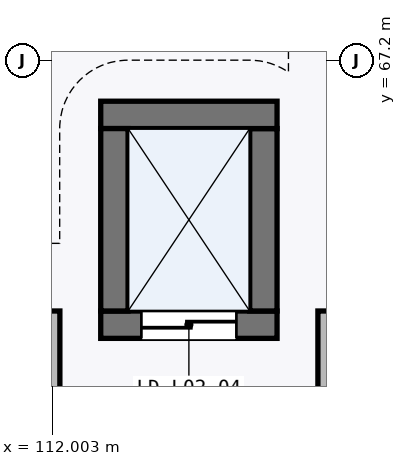
"""IFC4 building model, lengths in metres.
Left out: names, types, materials, properties, quantities, classifications, styles, units other than length and angle.
Written with IfcOpenShell. Run it as: python <this file> out.ifc"""

import sys

from ifc_helpers import new_model, si_unit, direction, frame, frame_2d, origin, place, context, subcontext, project, spatial, rectangle, extrude, element, fill, save


model = new_model("IFC4")
c1 = context("Model", 3, precision=1e-05, world=origin(), true_north=direction((0.0, 1.0)))
c2 = subcontext(c1, "Body", "Model", "MODEL_VIEW")
j1 = project(units=[si_unit("LENGTHUNIT", "METRE"), si_unit("PLANEANGLEUNIT", "RADIAN")], contexts=[c1])
p1 = place(None, origin())
s1 = spatial("IfcSite", under=j1, at=p1, CompositionType="ELEMENT")
p2 = place(p1, origin())
s2 = spatial("IfcBuilding", under=s1, at=p2, CompositionType="ELEMENT")
p3 = place(p2, frame((0.0, 0.0, 6.0)))
s3 = spatial("IfcBuildingStorey", under=s2, at=p3, CompositionType="ELEMENT", Elevation=6.0)
p4 = place(p3, frame((112.64, 63.72, 0.0), z_axis=(0.0, 0.0, 1.0), x_axis=(1.0, 0.0, 0.0)))
e1 = element("IfcWall", 1, at=p4, inside=s3, PredefinedType="SHEAR", context=c2, shape_type="SweptSolid", body=[
    extrude(rectangle(XDim=2.32, YDim=0.36, at=frame_2d((1.16, 0.0))), origin(), (0.0, 0.0, 1.0), 5.145),
])
p5 = place(p4, frame((0.535, 0.0, 0.0)))
e2 = element("IfcOpeningElement", 2, at=p5, cuts=e1, PredefinedType="OPENING", context=c2, shape_type="SweptSolid", body=[
    extrude(rectangle(XDim=1.25, YDim=2.2, at=frame_2d((0.625, 1.1))), frame((0.0, 0.19, 0.0), z_axis=(0.0, -1.0, 0.0), x_axis=(1.0, 0.0, 0.0)), (0.0, 0.0, 1.0), 0.38),
])
p6 = place(p3, frame((114.78, 63.9, 0.0), z_axis=(0.0, 0.0, 1.0), x_axis=(0.0, 1.0, 0.0)))
e3 = element("IfcWall", 3, at=p6, inside=s3, PredefinedType="SHEAR", context=c2, shape_type="SweptSolid", body=[
    extrude(rectangle(XDim=2.4, YDim=0.36, at=frame_2d((1.2, 0.0))), origin(), (0.0, 0.0, 1.0), 5.145),
])
p7 = place(p3, frame((114.96, 66.48, 0.0), z_axis=(0.0, 0.0, 1.0), x_axis=(-1.0, 0.0, 0.0)))
e4 = element("IfcWall", 4, at=p7, inside=s3, PredefinedType="SHEAR", context=c2, shape_type="SweptSolid", body=[
    extrude(rectangle(XDim=2.32, YDim=0.36, at=frame_2d((1.16, 0.0))), origin(), (0.0, 0.0, 1.0), 5.145),
])
p8 = place(p3, frame((112.82, 66.3, 0.0), z_axis=(0.0, 0.0, 1.0), x_axis=(0.0, -1.0, 0.0)))
e5 = element("IfcWall", 5, at=p8, inside=s3, PredefinedType="SHEAR", context=c2, shape_type="SweptSolid", body=[
    extrude(rectangle(XDim=2.4, YDim=0.36, at=frame_2d((1.2, 0.0))), origin(), (0.0, 0.0, 1.0), 5.145),
])
for number, where, z_axis, x_axis in (
    (6, (115.6, 59.397, 0.0), (0.0, 0.0, 1.0), (0.0, 1.0, 0.0)),
    (7, (112.0, 63.9, 0.0), (0.0, 0.0, 1.0), (0.0, -1.0, 0.0)),
):
    element("IfcWall", number, at=place(p3, frame(where, z_axis=z_axis, x_axis=x_axis)), inside=s3, PredefinedType="PARTITIONING", context=c2, shape_type="SweptSolid", body=[
        extrude(rectangle(XDim=4.502, YDim=0.205, at=frame_2d((2.251, 0.0))), origin(), (0.0, 0.0, 1.0), 5.145),
    ])
p9 = place(p5, frame((1.25, 0.0, 0.0), z_axis=(0.0, 0.0, 1.0), x_axis=(-1.0, 0.0, 0.0)))
e8 = element("IfcDoor", 8, at=p9, inside=s3, OperationType="DOUBLE_DOOR_SLIDING", PredefinedType="DOOR", context=c2, shape_type="SweptSolid", body=[
    extrude(rectangle(XDim=1.25, YDim=2.2, at=frame_2d((0.625, 1.1))), frame((0.0, 0.025, 0.0), z_axis=(0.0, -1.0, 0.0), x_axis=(1.0, 0.0, 0.0)), (0.0, 0.0, 1.0), 0.05),
])
fill(e2, e8)
save(model, sys.argv[1])
